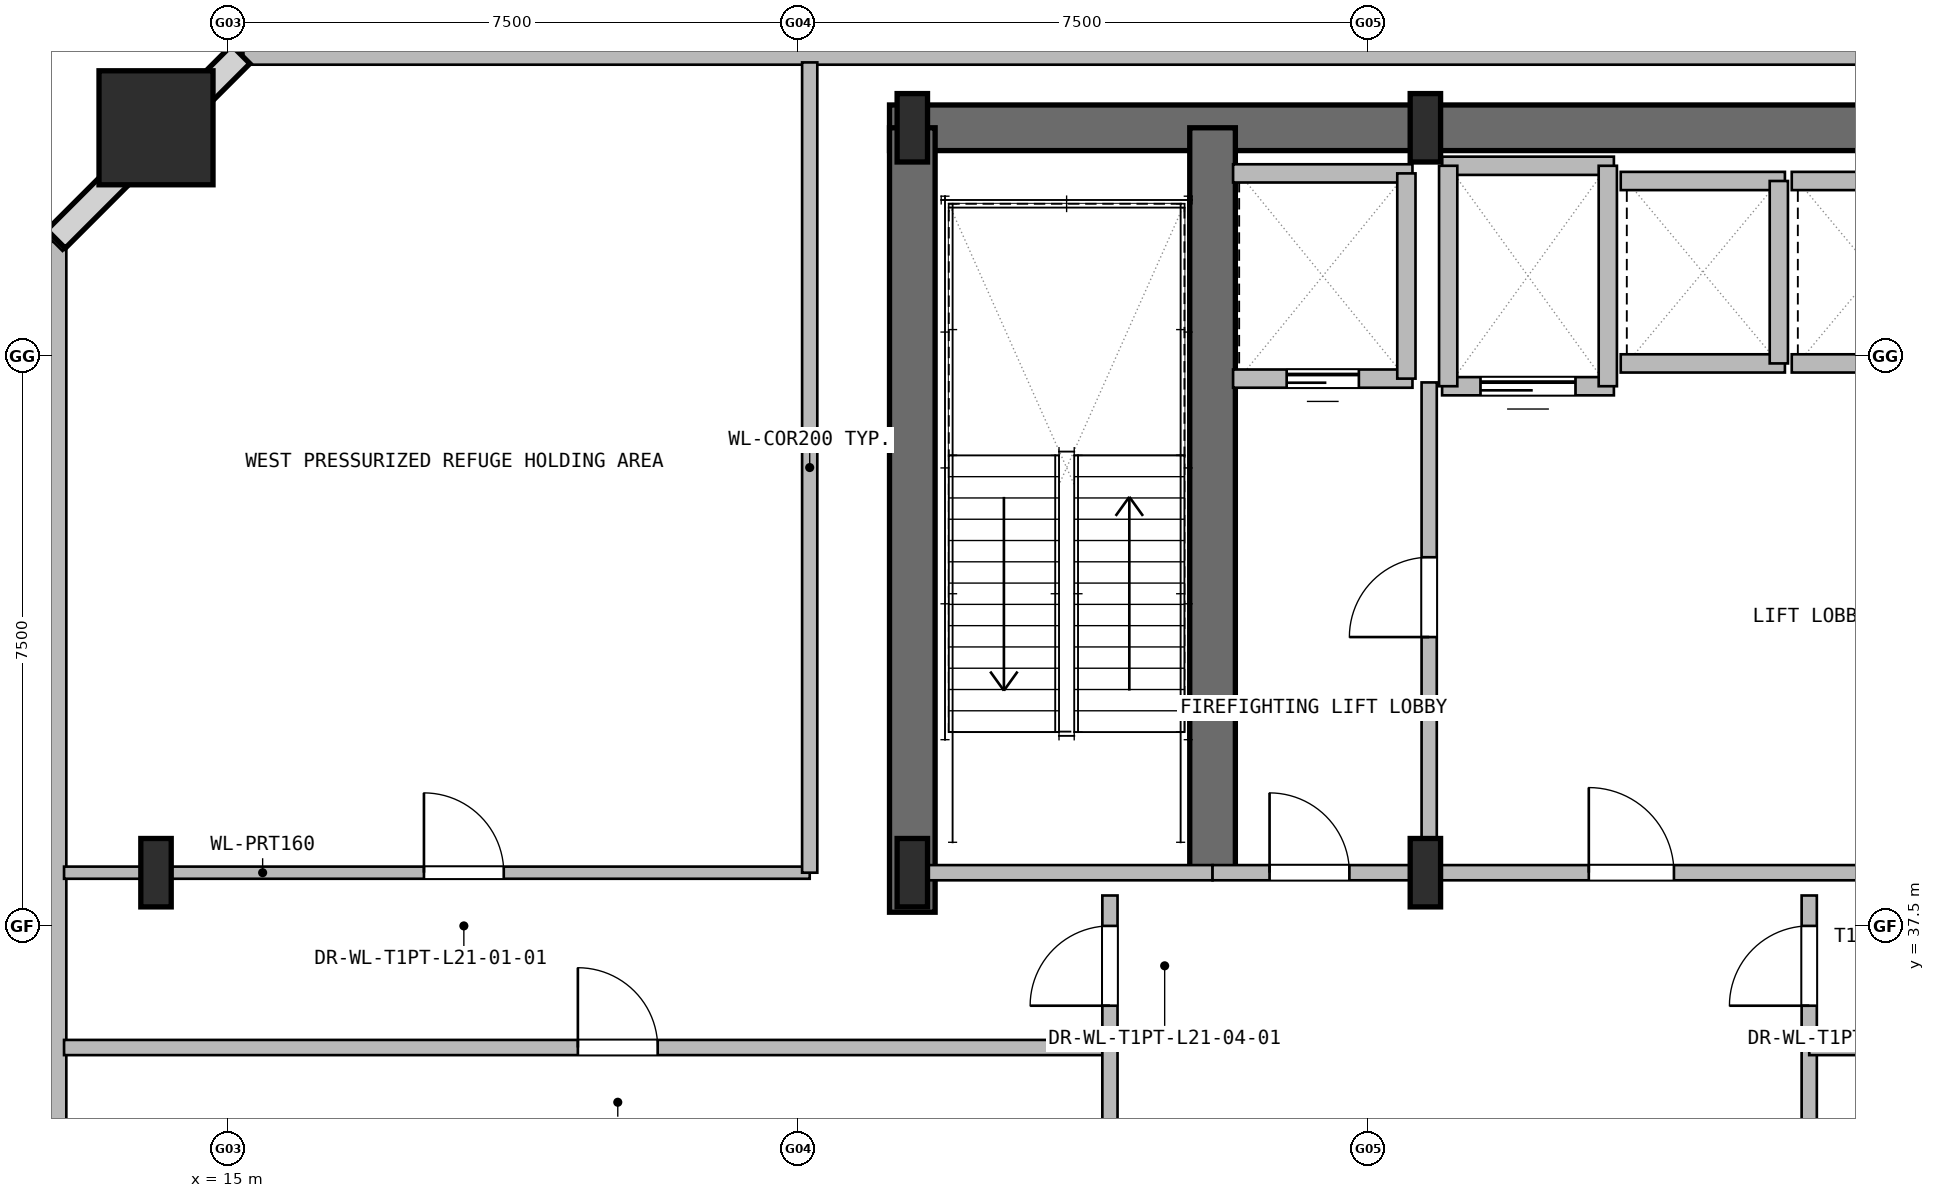
"""IFC4 building model, lengths in metres.
Left out: names, types, materials, properties, quantities, classifications, styles, units other than length and angle.
Written with IfcOpenShell. Run it as: python <this file> out.ifc"""

import sys

from ifc_helpers import new_model, si_unit, direction, frame, frame_2d, origin, origin_2d, place, context, subcontext, project, spatial, rectangle, hollow_rectangle, i_section, extrude, element, fill, save


model = new_model("IFC4")
c1 = context("Model", 3, precision=1e-05, world=origin(), true_north=direction((0.0, 1.0)))
c2 = subcontext(c1, "Body", "Model", "MODEL_VIEW")
j1 = project(units=[si_unit("LENGTHUNIT", "METRE"), si_unit("PLANEANGLEUNIT", "RADIAN")], contexts=[c1])
p1 = place(None, origin())
s1 = spatial("IfcSite", under=j1, at=p1, CompositionType="ELEMENT")
p2 = place(p1, origin())
s2 = spatial("IfcBuilding", under=s1, at=p2, CompositionType="ELEMENT")
p3 = place(p2, frame((0.0, 0.0, 81.9)))
s3 = spatial("IfcBuildingStorey", under=s2, at=p3, CompositionType="ELEMENT", Elevation=81.9)
p4 = place(p3, frame((23.7, 48.0, 0.0), z_axis=(0.0, 0.0, 1.0), x_axis=(1.0, 0.0, 0.0)))
e1 = element("IfcWall", 1, at=p4, inside=s3, PredefinedType="SHEAR", context=c2, shape_type="SweptSolid", body=[
    extrude(rectangle(XDim=27.6, YDim=0.6, at=frame_2d((13.8, 0.0))), origin(), (0.0, 0.0, 1.0), 4.8),
])
p5 = place(p3, frame((24.0, 37.68, 0.0), z_axis=(0.0, 0.0, 1.0), x_axis=(0.0, 1.0, 0.0)))
e2 = element("IfcWall", 2, at=p5, inside=s3, PredefinedType="SHEAR", context=c2, shape_type="SweptSolid", body=[
    extrude(rectangle(XDim=10.32, YDim=0.6, at=frame_2d((5.16, 0.0))), origin(), (0.0, 0.0, 1.0), 4.8),
])
p6 = place(p3, frame((27.95, 38.2, 0.0), z_axis=(0.0, 0.0, 1.0), x_axis=(0.0, 1.0, 0.0)))
e3 = element("IfcWall", 3, at=p6, inside=s3, PredefinedType="SHEAR", context=c2, shape_type="SweptSolid", body=[
    extrude(rectangle(XDim=9.8, YDim=0.6, at=frame_2d((4.9, 0.0))), origin(), (0.0, 0.0, 1.0), 4.8),
])
p7 = place(p3, frame((14.05, 38.2, 0.0), z_axis=(0.0, 0.0, 1.0), x_axis=(1.0, 0.0, 0.0)))
e4 = element("IfcColumn", 4, at=p7, inside=s3, PredefinedType="COLUMN", context=c2, shape_type="SweptSolid", body=[
    extrude(i_section(OverallWidth=0.4, OverallDepth=0.9, WebThickness=0.02, FlangeThickness=0.036, at=origin_2d()), origin(), (0.0, 0.0, 1.0), 4.8),
])
p8 = place(p3, frame((14.05, 48.0, 0.0), z_axis=(0.0, 0.0, 1.0), x_axis=(1.0, 0.0, 0.0)))
e5 = element("IfcColumn", 5, at=p8, inside=s3, PredefinedType="COLUMN", context=c2, shape_type="SweptSolid", body=[
    extrude(hollow_rectangle(XDim=1.5, YDim=1.5, WallThickness=0.04, at=origin_2d()), origin(), (0.0, 0.0, 1.0), 4.8),
])
for number, where, z_axis, x_axis in (
    (6, (24.0, 38.2, 0.0), (0.0, 0.0, 1.0), (1.0, 0.0, 0.0)),
    (7, (24.0, 48.0, 0.0), (0.0, 0.0, 1.0), (1.0, 0.0, 0.0)),
    (8, (30.75, 38.2, 0.0), (0.0, 0.0, 1.0), (1.0, 0.0, 0.0)),
    (9, (30.75, 48.0, 0.0), (0.0, 0.0, 1.0), (1.0, 0.0, 0.0)),
):
    element("IfcColumn", number, at=place(p3, frame(where, z_axis=z_axis, x_axis=x_axis)), inside=s3, PredefinedType="COLUMN", context=c2, shape_type="SweptSolid", body=[
        extrude(i_section(OverallWidth=0.4, OverallDepth=0.9, WebThickness=0.02, FlangeThickness=0.036, at=origin_2d()), origin(), (0.0, 0.0, 1.0), 4.8),
    ])
p9 = place(p3, frame((12.7, 19.5, 0.0), z_axis=(0.0, 0.0, 1.0), x_axis=(0.0, 1.0, 0.0)))
e10 = element("IfcWall", 10, at=p9, inside=s3, PredefinedType="SOLIDWALL", context=c2, shape_type="SweptSolid", body=[
    extrude(rectangle(XDim=27.0, YDim=0.34, at=frame_2d((13.5, 0.0))), origin(), (0.0, 0.0, 1.0), 4.53),
])
p10 = place(p3, frame((12.7, 46.5, 0.0), z_axis=(0.0, 0.0, 1.0), x_axis=(0.707106781187, 0.707106781187, 0.0)))
e11 = element("IfcWall", 11, at=p10, inside=s3, PredefinedType="SOLIDWALL", context=c2, shape_type="SweptSolid", body=[
    extrude(rectangle(XDim=3.536, YDim=0.34, at=frame_2d((1.768, 0.0))), origin(), (0.0, 0.0, 1.0), 4.53),
])
p11 = place(p3, frame((15.2, 49.0, 0.0), z_axis=(0.0, 0.0, 1.0), x_axis=(1.0, 0.0, 0.0)))
e12 = element("IfcWall", 12, at=p11, inside=s3, PredefinedType="SOLIDWALL", context=c2, shape_type="SweptSolid", body=[
    extrude(rectangle(XDim=44.6, YDim=0.34, at=frame_2d((22.3, 0.0))), origin(), (0.0, 0.0, 1.0), 4.53),
])
p12 = place(p3, frame((24.0, 38.2, 0.0), z_axis=(0.0, 0.0, 1.0), x_axis=(1.0, 0.0, 0.0)))
e13 = element("IfcWall", 13, at=p12, inside=s3, PredefinedType="PARTITIONING", context=c2, shape_type="SweptSolid", body=[
    extrude(rectangle(XDim=3.95, YDim=0.2, at=frame_2d((1.975, 0.0))), origin(), (0.0, 0.0, 1.0), 3.83),
])
p13 = place(p3, frame((30.8, 38.2, 0.0), z_axis=(0.0, 0.0, 1.0), x_axis=(0.0, 1.0, 0.0)))
e14 = element("IfcWall", 14, at=p13, inside=s3, PredefinedType="PARTITIONING", context=c2, shape_type="SweptSolid", body=[
    extrude(rectangle(XDim=6.45, YDim=0.2, at=frame_2d((3.225, 0.0))), origin(), (0.0, 0.0, 1.0), 3.83),
])
p14 = place(p13, frame((3.1, 0.0, 0.0)))
e15 = element("IfcOpeningElement", 15, at=p14, cuts=e14, PredefinedType="OPENING", context=c2, shape_type="SweptSolid", body=[
    extrude(rectangle(XDim=1.05, YDim=2.1, at=frame_2d((0.525, 1.05))), frame((0.0, 0.11, 0.0), z_axis=(0.0, -1.0, 0.0), x_axis=(1.0, 0.0, 0.0)), (0.0, 0.0, 1.0), 0.22),
])
p15 = place(p3, frame((27.95, 38.2, 0.0), z_axis=(0.0, 0.0, 1.0), x_axis=(1.0, 0.0, 0.0)))
e16 = element("IfcWall", 16, at=p15, inside=s3, PredefinedType="PARTITIONING", context=c2, shape_type="SweptSolid", body=[
    extrude(rectangle(XDim=2.85, YDim=0.2, at=frame_2d((1.425, 0.0))), origin(), (0.0, 0.0, 1.0), 3.83),
])
p16 = place(p15, frame((0.75, 0.0, 0.0)))
e17 = element("IfcOpeningElement", 17, at=p16, cuts=e16, PredefinedType="OPENING", context=c2, shape_type="SweptSolid", body=[
    extrude(rectangle(XDim=1.05, YDim=2.1, at=frame_2d((0.525, 1.05))), frame((0.0, 0.11, 0.0), z_axis=(0.0, -1.0, 0.0), x_axis=(1.0, 0.0, 0.0)), (0.0, 0.0, 1.0), 0.22),
])
p17 = place(p3, frame((30.8, 38.2, 0.0), z_axis=(0.0, 0.0, 1.0), x_axis=(1.0, 0.0, 0.0)))
e18 = element("IfcWall", 18, at=p17, inside=s3, PredefinedType="PARTITIONING", context=c2, shape_type="SweptSolid", body=[
    extrude(rectangle(XDim=16.35, YDim=0.2, at=frame_2d((8.175, 0.0))), origin(), (0.0, 0.0, 1.0), 3.83),
])
p18 = place(p17, frame((2.1, 0.0, 0.0)))
e19 = element("IfcOpeningElement", 19, at=p18, cuts=e18, PredefinedType="OPENING", context=c2, shape_type="SweptSolid", body=[
    extrude(rectangle(XDim=1.12, YDim=2.1, at=frame_2d((0.56, 1.05))), frame((0.0, 0.11, 0.0), z_axis=(0.0, -1.0, 0.0), x_axis=(1.0, 0.0, 0.0)), (0.0, 0.0, 1.0), 0.22),
])
p19 = place(p17, frame((7.95, 0.0, 0.0)))
e20 = element("IfcOpeningElement", 20, at=p19, cuts=e18, PredefinedType="OPENING", context=c2, shape_type="SweptSolid", body=[
    extrude(rectangle(XDim=1.12, YDim=2.1, at=frame_2d((0.56, 1.05))), frame((0.0, 0.11, 0.0), z_axis=(0.0, -1.0, 0.0), x_axis=(1.0, 0.0, 0.0)), (0.0, 0.0, 1.0), 0.22),
])
p20 = place(p3, frame((28.22, 44.7, 0.0), z_axis=(0.0, 0.0, 1.0), x_axis=(1.0, 0.0, 0.0)))
e21 = element("IfcWall", 21, at=p20, inside=s3, PredefinedType="PARTITIONING", context=c2, shape_type="SweptSolid", body=[
    extrude(rectangle(XDim=2.36, YDim=0.24, at=frame_2d((1.18, 0.0))), origin(), (0.0, 0.0, 1.0), 4.23),
])
p21 = place(p20, frame((0.705, 0.0, 0.0)))
e22 = element("IfcOpeningElement", 22, at=p21, cuts=e21, PredefinedType="OPENING", context=c2, shape_type="SweptSolid", body=[
    extrude(rectangle(XDim=0.95, YDim=2.15, at=frame_2d((0.475, 1.075))), frame((0.0, 0.13, 0.0), z_axis=(0.0, -1.0, 0.0), x_axis=(1.0, 0.0, 0.0)), (0.0, 0.0, 1.0), 0.26),
])
p22 = place(p3, frame((28.22, 47.4, 0.0), z_axis=(0.0, 0.0, 1.0), x_axis=(1.0, 0.0, 0.0)))
e23 = element("IfcWall", 23, at=p22, inside=s3, PredefinedType="PARTITIONING", context=c2, shape_type="SweptSolid", body=[
    extrude(rectangle(XDim=2.36, YDim=0.24, at=frame_2d((1.18, 0.0))), origin(), (0.0, 0.0, 1.0), 4.53),
])
p23 = place(p3, frame((30.5, 44.7, 0.0), z_axis=(0.0, 0.0, 1.0), x_axis=(0.0, 1.0, 0.0)))
e24 = element("IfcWall", 24, at=p23, inside=s3, PredefinedType="PARTITIONING", context=c2, shape_type="SweptSolid", body=[
    extrude(rectangle(XDim=2.7, YDim=0.24, at=frame_2d((1.35, 0.0))), origin(), (0.0, 0.0, 1.0), 3.83),
])
p24 = place(p3, frame((30.97, 44.6, 0.0), z_axis=(0.0, 0.0, 1.0), x_axis=(1.0, 0.0, 0.0)))
e25 = element("IfcWall", 25, at=p24, inside=s3, PredefinedType="PARTITIONING", context=c2, shape_type="SweptSolid", body=[
    extrude(rectangle(XDim=2.26, YDim=0.24, at=frame_2d((1.13, 0.0))), origin(), (0.0, 0.0, 1.0), 4.53),
])
p25 = place(p24, frame((0.505, 0.0, 0.0)))
e26 = element("IfcOpeningElement", 26, at=p25, cuts=e25, PredefinedType="OPENING", context=c2, shape_type="SweptSolid", body=[
    extrude(rectangle(XDim=1.25, YDim=2.2, at=frame_2d((0.625, 1.1))), frame((0.0, 0.13, 0.0), z_axis=(0.0, -1.0, 0.0), x_axis=(1.0, 0.0, 0.0)), (0.0, 0.0, 1.0), 0.26),
])
p26 = place(p3, frame((30.97, 47.5, 0.0), z_axis=(0.0, 0.0, 1.0), x_axis=(1.0, 0.0, 0.0)))
e27 = element("IfcWall", 27, at=p26, inside=s3, PredefinedType="PARTITIONING", context=c2, shape_type="SweptSolid", body=[
    extrude(rectangle(XDim=2.26, YDim=0.24, at=frame_2d((1.13, 0.0))), origin(), (0.0, 0.0, 1.0), 4.53),
])
for number, where, z_axis, x_axis in (
    (28, (31.05, 44.6, 0.0), (0.0, 0.0, 1.0), (0.0, 1.0, 0.0)),
    (29, (33.15, 44.6, 0.0), (0.0, 0.0, 1.0), (0.0, 1.0, 0.0)),
):
    element("IfcWall", number, at=place(p3, frame(where, z_axis=z_axis, x_axis=x_axis)), inside=s3, PredefinedType="PARTITIONING", context=c2, shape_type="SweptSolid", body=[
        extrude(rectangle(XDim=2.9, YDim=0.24, at=frame_2d((1.45, 0.0))), origin(), (0.0, 0.0, 1.0), 4.53),
    ])
for number, where, z_axis, x_axis in (
    (30, (33.32, 44.9, 0.0), (0.0, 0.0, 1.0), (1.0, 0.0, 0.0)),
    (31, (33.32, 47.3, 0.0), (0.0, 0.0, 1.0), (1.0, 0.0, 0.0)),
):
    element("IfcWall", number, at=place(p3, frame(where, z_axis=z_axis, x_axis=x_axis)), inside=s3, PredefinedType="PARTITIONING", context=c2, shape_type="SweptSolid", body=[
        extrude(rectangle(XDim=2.16, YDim=0.24, at=frame_2d((1.08, 0.0))), origin(), (0.0, 0.0, 1.0), 4.53),
    ])
p27 = place(p3, frame((35.4, 44.9, 0.0), z_axis=(0.0, 0.0, 1.0), x_axis=(0.0, 1.0, 0.0)))
e32 = element("IfcWall", 32, at=p27, inside=s3, PredefinedType="PARTITIONING", context=c2, shape_type="SweptSolid", body=[
    extrude(rectangle(XDim=2.4, YDim=0.24, at=frame_2d((1.2, 0.0))), origin(), (0.0, 0.0, 1.0), 4.53),
])
for number, where, z_axis, x_axis in (
    (33, (35.57, 44.9, 0.0), (0.0, 0.0, 1.0), (1.0, 0.0, 0.0)),
    (34, (35.57, 47.3, 0.0), (0.0, 0.0, 1.0), (1.0, 0.0, 0.0)),
):
    element("IfcWall", number, at=place(p3, frame(where, z_axis=z_axis, x_axis=x_axis)), inside=s3, PredefinedType="PARTITIONING", context=c2, shape_type="SweptSolid", body=[
        extrude(rectangle(XDim=2.16, YDim=0.24, at=frame_2d((1.08, 0.0))), origin(), (0.0, 0.0, 1.0), 4.53),
    ])
p28 = place(p3, frame((12.84, 38.2, 0.0), z_axis=(0.0, 0.0, 1.0), x_axis=(1.0, 0.0, 0.0)))
e35 = element("IfcWall", 35, at=p28, inside=s3, PredefinedType="PARTITIONING", context=c2, shape_type="SweptSolid", body=[
    extrude(rectangle(XDim=9.81, YDim=0.16, at=frame_2d((4.905, 0.0))), origin(), (0.0, 0.0, 1.0), 3.83),
])
p29 = place(p28, frame((4.735, 0.0, 0.0)))
e36 = element("IfcOpeningElement", 36, at=p29, cuts=e35, PredefinedType="OPENING", context=c2, shape_type="SweptSolid", body=[
    extrude(rectangle(XDim=1.05, YDim=2.1, at=frame_2d((0.525, 1.05))), frame((0.0, 0.09, 0.0), z_axis=(0.0, -1.0, 0.0), x_axis=(1.0, 0.0, 0.0)), (0.0, 0.0, 1.0), 0.18),
])
p30 = place(p3, frame((22.65, 38.2, 0.0), z_axis=(0.0, 0.0, 1.0), x_axis=(0.0, 1.0, 0.0)))
e37 = element("IfcWall", 37, at=p30, inside=s3, PredefinedType="PARTITIONING", context=c2, shape_type="SweptSolid", body=[
    extrude(rectangle(XDim=10.66, YDim=0.2, at=frame_2d((5.33, 0.0))), origin(), (0.0, 0.0, 1.0), 4.53),
])
p31 = place(p3, frame((12.84, 35.9, 0.0), z_axis=(0.0, 0.0, 1.0), x_axis=(1.0, 0.0, 0.0)))
e38 = element("IfcWall", 38, at=p31, inside=s3, PredefinedType="PARTITIONING", context=c2, shape_type="SweptSolid", body=[
    extrude(rectangle(XDim=13.76, YDim=0.2, at=frame_2d((6.88, 0.0))), origin(), (0.0, 0.0, 1.0), 4.53),
])
p32 = place(p31, frame((6.76, 0.0, 0.0)))
e39 = element("IfcOpeningElement", 39, at=p32, cuts=e38, PredefinedType="OPENING", context=c2, shape_type="SweptSolid", body=[
    extrude(rectangle(XDim=1.05, YDim=2.1, at=frame_2d((0.525, 1.05))), frame((0.0, 0.11, 0.0), z_axis=(0.0, -1.0, 0.0), x_axis=(1.0, 0.0, 0.0)), (0.0, 0.0, 1.0), 0.22),
])
p33 = place(p3, frame((26.6, 17.0, 0.0), z_axis=(0.0, 0.0, 1.0), x_axis=(0.0, 1.0, 0.0)))
e40 = element("IfcWall", 40, at=p33, inside=s3, PredefinedType="PARTITIONING", context=c2, shape_type="SweptSolid", body=[
    extrude(rectangle(XDim=20.9, YDim=0.2, at=frame_2d((10.45, 0.0))), origin(), (0.0, 0.0, 1.0), 4.53),
])
p34 = place(p33, frame((19.45, 0.0, 0.0)))
e41 = element("IfcOpeningElement", 41, at=p34, cuts=e40, PredefinedType="OPENING", context=c2, shape_type="SweptSolid", body=[
    extrude(rectangle(XDim=1.05, YDim=2.1, at=frame_2d((0.525, 1.05))), frame((0.0, 0.11, 0.0), z_axis=(0.0, -1.0, 0.0), x_axis=(1.0, 0.0, 0.0)), (0.0, 0.0, 1.0), 0.22),
])
p35 = place(p3, frame((35.8, 17.0, 0.0), z_axis=(0.0, 0.0, 1.0), x_axis=(0.0, 1.0, 0.0)))
e42 = element("IfcWall", 42, at=p35, inside=s3, PredefinedType="PARTITIONING", context=c2, shape_type="SweptSolid", body=[
    extrude(rectangle(XDim=20.9, YDim=0.2, at=frame_2d((10.45, 0.0))), origin(), (0.0, 0.0, 1.0), 4.53),
])
p36 = place(p35, frame((19.45, 0.0, 0.0)))
e43 = element("IfcOpeningElement", 43, at=p36, cuts=e42, PredefinedType="OPENING", context=c2, shape_type="SweptSolid", body=[
    extrude(rectangle(XDim=1.05, YDim=2.1, at=frame_2d((0.525, 1.05))), frame((0.0, 0.11, 0.0), z_axis=(0.0, -1.0, 0.0), x_axis=(1.0, 0.0, 0.0)), (0.0, 0.0, 1.0), 0.22),
])
p37 = place(p3, frame((35.8, 35.9, 0.0), z_axis=(0.0, 0.0, 1.0), x_axis=(1.0, 0.0, 0.0)))
e44 = element("IfcWall", 44, at=p37, inside=s3, PredefinedType="PARTITIONING", context=c2, shape_type="SweptSolid", body=[
    extrude(rectangle(XDim=13.85, YDim=0.2, at=frame_2d((6.925, 0.0))), origin(), (0.0, 0.0, 1.0), 4.53),
])
p38 = place(p37, frame((2.9, 0.0, 0.0)))
e45 = element("IfcOpeningElement", 45, at=p38, cuts=e44, PredefinedType="OPENING", context=c2, shape_type="SweptSolid", body=[
    extrude(rectangle(XDim=1.05, YDim=2.1, at=frame_2d((0.525, 1.05))), frame((0.0, 0.11, 0.0), z_axis=(0.0, -1.0, 0.0), x_axis=(1.0, 0.0, 0.0)), (0.0, 0.0, 1.0), 0.22),
])
p39 = place(p37, frame((9.825, 0.0, 0.0)))
e46 = element("IfcOpeningElement", 46, at=p39, cuts=e44, PredefinedType="OPENING", context=c2, shape_type="SweptSolid", body=[
    extrude(rectangle(XDim=1.05, YDim=2.1, at=frame_2d((0.525, 1.05))), frame((0.0, 0.11, 0.0), z_axis=(0.0, -1.0, 0.0), x_axis=(1.0, 0.0, 0.0)), (0.0, 0.0, 1.0), 0.22),
])
p40 = place(p14, origin())
e47 = element("IfcDoor", 47, at=p40, inside=s3, OperationType="SINGLE_SWING_LEFT", PredefinedType="DOOR", context=c2, shape_type="SweptSolid", body=[
    extrude(rectangle(XDim=1.05, YDim=2.1, at=frame_2d((0.525, 1.05))), frame((0.0, 0.025, 0.0), z_axis=(0.0, -1.0, 0.0), x_axis=(1.0, 0.0, 0.0)), (0.0, 0.0, 1.0), 0.05),
])
fill(e15, e47)
p41 = place(p16, origin())
e48 = element("IfcDoor", 48, at=p41, inside=s3, OperationType="SINGLE_SWING_RIGHT", PredefinedType="DOOR", context=c2, shape_type="SweptSolid", body=[
    extrude(rectangle(XDim=1.05, YDim=2.1, at=frame_2d((0.525, 1.05))), frame((0.0, 0.025, 0.0), z_axis=(0.0, -1.0, 0.0), x_axis=(1.0, 0.0, 0.0)), (0.0, 0.0, 1.0), 0.05),
])
fill(e17, e48)
p42 = place(p18, origin())
e49 = element("IfcDoor", 49, at=p42, inside=s3, OperationType="SINGLE_SWING_LEFT", PredefinedType="DOOR", context=c2, shape_type="SweptSolid", body=[
    extrude(rectangle(XDim=1.12, YDim=2.1, at=frame_2d((0.56, 1.05))), frame((0.0, 0.025, 0.0), z_axis=(0.0, -1.0, 0.0), x_axis=(1.0, 0.0, 0.0)), (0.0, 0.0, 1.0), 0.05),
])
fill(e19, e49)
p43 = place(p21, origin())
e50 = element("IfcDoor", 50, at=p43, inside=s3, OperationType="SLIDING_TO_LEFT", PredefinedType="DOOR", context=c2, shape_type="SweptSolid", body=[
    extrude(rectangle(XDim=0.95, YDim=2.15, at=frame_2d((0.475, 1.075))), frame((0.0, 0.025, 0.0), z_axis=(0.0, -1.0, 0.0), x_axis=(1.0, 0.0, 0.0)), (0.0, 0.0, 1.0), 0.05),
])
fill(e22, e50)
p44 = place(p25, origin())
e51 = element("IfcDoor", 51, at=p44, inside=s3, OperationType="SLIDING_TO_LEFT", PredefinedType="DOOR", context=c2, shape_type="SweptSolid", body=[
    extrude(rectangle(XDim=1.25, YDim=2.2, at=frame_2d((0.625, 1.1))), frame((0.0, 0.025, 0.0), z_axis=(0.0, -1.0, 0.0), x_axis=(1.0, 0.0, 0.0)), (0.0, 0.0, 1.0), 0.05),
])
fill(e26, e51)
p45 = place(p29, origin())
e52 = element("IfcDoor", 52, at=p45, inside=s3, OperationType="SINGLE_SWING_RIGHT", PredefinedType="DOOR", context=c2, shape_type="SweptSolid", body=[
    extrude(rectangle(XDim=1.05, YDim=2.1, at=frame_2d((0.525, 1.05))), frame((0.0, 0.025, 0.0), z_axis=(0.0, -1.0, 0.0), x_axis=(1.0, 0.0, 0.0)), (0.0, 0.0, 1.0), 0.05),
])
fill(e36, e52)
p46 = place(p32, origin())
e53 = element("IfcDoor", 53, at=p46, inside=s3, OperationType="SINGLE_SWING_LEFT", PredefinedType="DOOR", context=c2, shape_type="SweptSolid", body=[
    extrude(rectangle(XDim=1.05, YDim=2.1, at=frame_2d((0.525, 1.05))), frame((0.0, 0.025, 0.0), z_axis=(0.0, -1.0, 0.0), x_axis=(1.0, 0.0, 0.0)), (0.0, 0.0, 1.0), 0.05),
])
fill(e39, e53)
p47 = place(p34, origin())
e54 = element("IfcDoor", 54, at=p47, inside=s3, OperationType="SINGLE_SWING_RIGHT", PredefinedType="DOOR", context=c2, shape_type="SweptSolid", body=[
    extrude(rectangle(XDim=1.05, YDim=2.1, at=frame_2d((0.525, 1.05))), frame((0.0, 0.025, 0.0), z_axis=(0.0, -1.0, 0.0), x_axis=(1.0, 0.0, 0.0)), (0.0, 0.0, 1.0), 0.05),
])
fill(e41, e54)
p48 = place(p36, origin())
e55 = element("IfcDoor", 55, at=p48, inside=s3, OperationType="SINGLE_SWING_LEFT", PredefinedType="DOOR", context=c2, shape_type="SweptSolid", body=[
    extrude(rectangle(XDim=1.05, YDim=2.1, at=frame_2d((0.525, 1.05))), frame((0.0, 0.025, 0.0), z_axis=(0.0, -1.0, 0.0), x_axis=(1.0, 0.0, 0.0)), (0.0, 0.0, 1.0), 0.05),
])
fill(e43, e55)
save(model, sys.argv[1])
